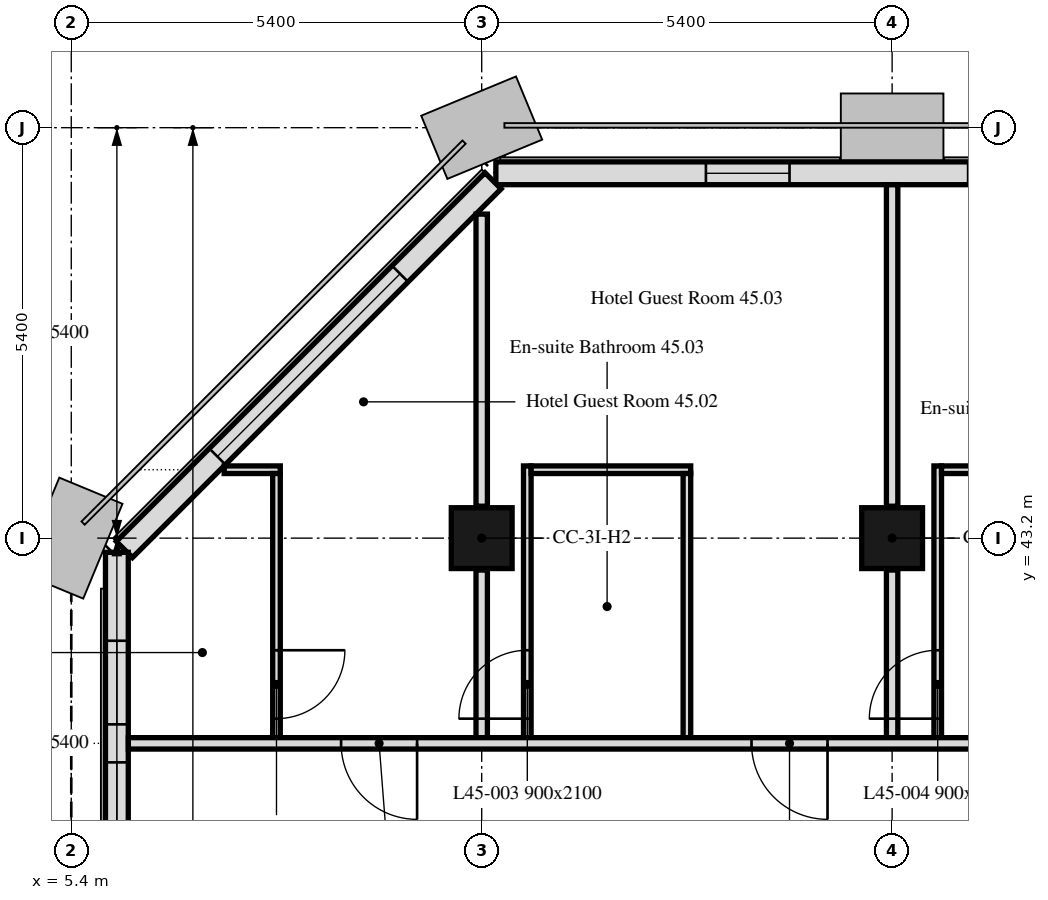
"""IFC4 building model, lengths in metres.
Left out: names, types, materials, properties, quantities, classifications, styles, units other than length and angle.
Written with IfcOpenShell. Run it as: python <this file> out.ifc"""

import sys

from ifc_helpers import new_model, si_unit, direction, frame, frame_2d, origin, origin_2d, place, context, subcontext, project, spatial, rectangle, extrude, element, fill, save


model = new_model("IFC4")
c1 = context("Model", 3, precision=1e-05, world=origin(), true_north=direction((0.0, 1.0)))
c2 = subcontext(c1, "Body", "Model", "MODEL_VIEW")
j1 = project(units=[si_unit("LENGTHUNIT", "METRE"), si_unit("PLANEANGLEUNIT", "RADIAN")], contexts=[c1])
p1 = place(None, origin())
s1 = spatial("IfcSite", under=j1, at=p1, CompositionType="ELEMENT")
p2 = place(p1, origin())
s2 = spatial("IfcBuilding", under=s1, at=p2, CompositionType="ELEMENT")
p3 = place(p2, frame((0.0, 0.0, 187.3)))
s3 = spatial("IfcBuildingStorey", under=s2, at=p3, CompositionType="ELEMENT", Elevation=187.3)
for number, where, z_axis, x_axis in (
    (1, (10.8, 43.2, 0.0), (0.0, 0.0, 1.0), (1.0, 0.0, 0.0)),
    (2, (16.2, 43.2, 0.0), (0.0, 0.0, 1.0), (1.0, 0.0, 0.0)),
):
    element("IfcColumn", number, at=place(p3, frame(where, z_axis=z_axis, x_axis=x_axis)), inside=s3, PredefinedType="COLUMN", context=c2, shape_type="SweptSolid", body=[
        extrude(rectangle(XDim=0.8, YDim=0.8, at=origin_2d()), origin(), (0.0, 0.0, 1.0), 3.0),
    ])
p4 = place(p3, frame((43.014, 48.0, 0.0), z_axis=(0.0, 0.0, 1.0), x_axis=(-1.0, 0.0, 0.0)))
e3 = element("IfcWall", 3, at=p4, inside=s3, PredefinedType="SOLIDWALL", context=c2, shape_type="SweptSolid", body=[
    extrude(rectangle(XDim=32.027, YDim=0.3, at=frame_2d((16.014, 0.0))), origin(), (0.0, 0.0, 1.0), 3.0),
])
p5 = place(p4, frame((0.814, 0.0, 0.9)))
e4 = element("IfcOpeningElement", 4, at=p5, cuts=e3, PredefinedType="OPENING", context=c2, shape_type="SweptSolid", body=[
    extrude(rectangle(XDim=3.4, YDim=1.7, at=frame_2d((1.7, 0.85))), frame((0.0, 0.16, 0.0), z_axis=(0.0, -1.0, 0.0), x_axis=(1.0, 0.0, 0.0)), (0.0, 0.0, 1.0), 0.32),
])
p6 = place(p4, frame((6.564, 0.0, 0.9)))
e5 = element("IfcOpeningElement", 5, at=p6, cuts=e3, PredefinedType="OPENING", context=c2, shape_type="SweptSolid", body=[
    extrude(rectangle(XDim=1.1, YDim=1.7, at=frame_2d((0.55, 0.85))), frame((0.0, 0.16, 0.0), z_axis=(0.0, -1.0, 0.0), x_axis=(1.0, 0.0, 0.0)), (0.0, 0.0, 1.0), 0.32),
])
p7 = place(p4, frame((11.614, 0.0, 0.9)))
e6 = element("IfcOpeningElement", 6, at=p7, cuts=e3, PredefinedType="OPENING", context=c2, shape_type="SweptSolid", body=[
    extrude(rectangle(XDim=3.4, YDim=1.7, at=frame_2d((1.7, 0.85))), frame((0.0, 0.16, 0.0), z_axis=(0.0, -1.0, 0.0), x_axis=(1.0, 0.0, 0.0)), (0.0, 0.0, 1.0), 0.32),
])
p8 = place(p4, frame((17.364, 0.0, 0.9)))
e7 = element("IfcOpeningElement", 7, at=p8, cuts=e3, PredefinedType="OPENING", context=c2, shape_type="SweptSolid", body=[
    extrude(rectangle(XDim=1.1, YDim=1.7, at=frame_2d((0.55, 0.85))), frame((0.0, 0.16, 0.0), z_axis=(0.0, -1.0, 0.0), x_axis=(1.0, 0.0, 0.0)), (0.0, 0.0, 1.0), 0.32),
])
p9 = place(p4, frame((22.414, 0.0, 0.9)))
e8 = element("IfcOpeningElement", 8, at=p9, cuts=e3, PredefinedType="OPENING", context=c2, shape_type="SweptSolid", body=[
    extrude(rectangle(XDim=3.4, YDim=1.7, at=frame_2d((1.7, 0.85))), frame((0.0, 0.16, 0.0), z_axis=(0.0, -1.0, 0.0), x_axis=(1.0, 0.0, 0.0)), (0.0, 0.0, 1.0), 0.32),
])
p10 = place(p4, frame((28.164, 0.0, 0.9)))
e9 = element("IfcOpeningElement", 9, at=p10, cuts=e3, PredefinedType="OPENING", context=c2, shape_type="SweptSolid", body=[
    extrude(rectangle(XDim=1.1, YDim=1.7, at=frame_2d((0.55, 0.85))), frame((0.0, 0.16, 0.0), z_axis=(0.0, -1.0, 0.0), x_axis=(1.0, 0.0, 0.0)), (0.0, 0.0, 1.0), 0.32),
])
p11 = place(p3, frame((10.949, 47.901, 0.0), z_axis=(0.0, 0.0, 1.0), x_axis=(-0.707106781187, -0.707106781187, 0.0)))
e10 = element("IfcWall", 10, at=p11, inside=s3, PredefinedType="SOLIDWALL", context=c2, shape_type="SweptSolid", body=[
    extrude(rectangle(XDim=6.86, YDim=0.3, at=frame_2d((3.43, 0.0))), origin(), (0.0, 0.0, 1.0), 3.0),
])
p12 = place(p11, frame((1.73, 0.0, 0.9)))
e11 = element("IfcOpeningElement", 11, at=p12, cuts=e10, PredefinedType="OPENING", context=c2, shape_type="SweptSolid", body=[
    extrude(rectangle(XDim=3.4, YDim=1.7, at=frame_2d((1.7, 0.85))), frame((0.0, 0.16, 0.0), z_axis=(0.0, -1.0, 0.0), x_axis=(1.0, 0.0, 0.0)), (0.0, 0.0, 1.0), 0.32),
])
p13 = place(p3, frame((6.0, 43.014, 0.0), z_axis=(0.0, 0.0, 1.0), x_axis=(0.0, -1.0, 0.0)))
e12 = element("IfcWall", 12, at=p13, inside=s3, PredefinedType="SOLIDWALL", context=c2, shape_type="SweptSolid", body=[
    extrude(rectangle(XDim=10.614, YDim=0.3, at=frame_2d((5.307, 0.0))), origin(), (0.0, 0.0, 1.0), 3.0),
])
p14 = place(p13, frame((1.164, 0.0, 0.9)))
e13 = element("IfcOpeningElement", 13, at=p14, cuts=e12, PredefinedType="OPENING", context=c2, shape_type="SweptSolid", body=[
    extrude(rectangle(XDim=1.1, YDim=1.7, at=frame_2d((0.55, 0.85))), frame((0.0, 0.16, 0.0), z_axis=(0.0, -1.0, 0.0), x_axis=(1.0, 0.0, 0.0)), (0.0, 0.0, 1.0), 0.32),
])
p15 = place(p13, frame((2.764, 0.0, 0.9)))
e14 = element("IfcOpeningElement", 14, at=p15, cuts=e12, PredefinedType="OPENING", context=c2, shape_type="SweptSolid", body=[
    extrude(rectangle(XDim=1.1, YDim=1.7, at=frame_2d((0.55, 0.85))), frame((0.0, 0.16, 0.0), z_axis=(0.0, -1.0, 0.0), x_axis=(1.0, 0.0, 0.0)), (0.0, 0.0, 1.0), 0.32),
])
p16 = place(p13, frame((6.564, 0.0, 0.9)))
e15 = element("IfcOpeningElement", 15, at=p16, cuts=e12, PredefinedType="OPENING", context=c2, shape_type="SweptSolid", body=[
    extrude(rectangle(XDim=1.1, YDim=1.7, at=frame_2d((0.55, 0.85))), frame((0.0, 0.16, 0.0), z_axis=(0.0, -1.0, 0.0), x_axis=(1.0, 0.0, 0.0)), (0.0, 0.0, 1.0), 0.32),
])
p17 = place(p13, frame((8.164, 0.0, 0.9)))
e16 = element("IfcOpeningElement", 16, at=p17, cuts=e12, PredefinedType="OPENING", context=c2, shape_type="SweptSolid", body=[
    extrude(rectangle(XDim=1.1, YDim=1.7, at=frame_2d((0.55, 0.85))), frame((0.0, 0.16, 0.0), z_axis=(0.0, -1.0, 0.0), x_axis=(1.0, 0.0, 0.0)), (0.0, 0.0, 1.0), 0.32),
])
p18 = place(p3, frame((7.412, 44.1, 0.0), z_axis=(0.0, 0.0, 1.0), x_axis=(1.0, 0.0, 0.0)))
e17 = element("IfcWall", 17, at=p18, inside=s3, PredefinedType="PARTITIONING", context=c2, shape_type="SweptSolid", body=[
    extrude(rectangle(XDim=0.738, YDim=0.1, at=frame_2d((0.369, 0.0))), origin(), (0.0, 0.0, 1.0), 3.0),
])
p19 = place(p3, frame((8.1, 44.05, 0.0), z_axis=(0.0, 0.0, 1.0), x_axis=(0.0, -1.0, 0.0)))
e18 = element("IfcWall", 18, at=p19, inside=s3, PredefinedType="PARTITIONING", context=c2, shape_type="SweptSolid", body=[
    extrude(rectangle(XDim=3.475, YDim=0.1, at=frame_2d((1.738, 0.0))), origin(), (0.0, 0.0, 1.0), 3.0),
])
p20 = place(p19, frame((2.325, 0.0, 0.0)))
e19 = element("IfcOpeningElement", 19, at=p20, cuts=e18, PredefinedType="OPENING", context=c2, shape_type="SweptSolid", body=[
    extrude(rectangle(XDim=0.9, YDim=2.1, at=frame_2d((0.45, 1.05))), frame((0.0, 0.05, 0.0), z_axis=(0.0, -1.0, 0.0), x_axis=(1.0, 0.0, 0.0)), (0.0, 0.0, 1.0), 0.1),
])
p21 = place(p3, frame((10.8, 40.575, 0.0), z_axis=(0.0, 0.0, 1.0), x_axis=(0.0, 1.0, 0.0)))
e20 = element("IfcWall", 20, at=p21, inside=s3, PredefinedType="PARTITIONING", context=c2, shape_type="SweptSolid", body=[
    extrude(rectangle(XDim=2.205, YDim=0.15, at=frame_2d((1.103, 0.0))), origin(), (0.0, 0.0, 1.0), 3.0),
])
p22 = place(p3, frame((10.8, 43.62, 0.0), z_axis=(0.0, 0.0, 1.0), x_axis=(0.0, 1.0, 0.0)))
e21 = element("IfcWall", 21, at=p22, inside=s3, PredefinedType="PARTITIONING", context=c2, shape_type="SweptSolid", body=[
    extrude(rectangle(XDim=3.843, YDim=0.15, at=frame_2d((1.921, 0.0))), origin(), (0.0, 0.0, 1.0), 3.0),
])
p23 = place(p3, frame((11.4, 40.575, 0.0), z_axis=(0.0, 0.0, 1.0), x_axis=(0.0, 1.0, 0.0)))
e22 = element("IfcWall", 22, at=p23, inside=s3, PredefinedType="PARTITIONING", context=c2, shape_type="SweptSolid", body=[
    extrude(rectangle(XDim=3.575, YDim=0.1, at=frame_2d((1.788, 0.0))), origin(), (0.0, 0.0, 1.0), 3.0),
])
p24 = place(p23, frame((0.25, 0.0, 0.0)))
e23 = element("IfcOpeningElement", 23, at=p24, cuts=e22, PredefinedType="OPENING", context=c2, shape_type="SweptSolid", body=[
    extrude(rectangle(XDim=0.9, YDim=2.1, at=frame_2d((0.45, 1.05))), frame((0.0, 0.05, 0.0), z_axis=(0.0, -1.0, 0.0), x_axis=(1.0, 0.0, 0.0)), (0.0, 0.0, 1.0), 0.1),
])
p25 = place(p3, frame((11.45, 44.1, 0.0), z_axis=(0.0, 0.0, 1.0), x_axis=(1.0, 0.0, 0.0)))
e24 = element("IfcWall", 24, at=p25, inside=s3, PredefinedType="PARTITIONING", context=c2, shape_type="SweptSolid", body=[
    extrude(rectangle(XDim=2.1, YDim=0.1, at=frame_2d((1.05, 0.0))), origin(), (0.0, 0.0, 1.0), 3.0),
])
p26 = place(p3, frame((13.5, 44.05, 0.0), z_axis=(0.0, 0.0, 1.0), x_axis=(0.0, -1.0, 0.0)))
e25 = element("IfcWall", 25, at=p26, inside=s3, PredefinedType="PARTITIONING", context=c2, shape_type="SweptSolid", body=[
    extrude(rectangle(XDim=3.475, YDim=0.1, at=frame_2d((1.738, 0.0))), origin(), (0.0, 0.0, 1.0), 3.0),
])
p27 = place(p3, frame((16.2, 40.575, 0.0), z_axis=(0.0, 0.0, 1.0), x_axis=(0.0, 1.0, 0.0)))
e26 = element("IfcWall", 26, at=p27, inside=s3, PredefinedType="PARTITIONING", context=c2, shape_type="SweptSolid", body=[
    extrude(rectangle(XDim=2.205, YDim=0.15, at=frame_2d((1.103, 0.0))), origin(), (0.0, 0.0, 1.0), 2.4),
])
p28 = place(p3, frame((16.2, 43.62, 0.0), z_axis=(0.0, 0.0, 1.0), x_axis=(0.0, 1.0, 0.0)))
e27 = element("IfcWall", 27, at=p28, inside=s3, PredefinedType="PARTITIONING", context=c2, shape_type="SweptSolid", body=[
    extrude(rectangle(XDim=4.229, YDim=0.15, at=frame_2d((2.115, 0.0))), origin(), (0.0, 0.0, 1.0), 2.4),
])
p29 = place(p3, frame((16.8, 40.575, 0.0), z_axis=(0.0, 0.0, 1.0), x_axis=(0.0, 1.0, 0.0)))
e28 = element("IfcWall", 28, at=p29, inside=s3, PredefinedType="PARTITIONING", context=c2, shape_type="SweptSolid", body=[
    extrude(rectangle(XDim=3.575, YDim=0.1, at=frame_2d((1.788, 0.0))), origin(), (0.0, 0.0, 1.0), 3.0),
])
p30 = place(p29, frame((0.25, 0.0, 0.0)))
e29 = element("IfcOpeningElement", 29, at=p30, cuts=e28, PredefinedType="OPENING", context=c2, shape_type="SweptSolid", body=[
    extrude(rectangle(XDim=0.9, YDim=2.1, at=frame_2d((0.45, 1.05))), frame((0.0, 0.05, 0.0), z_axis=(0.0, -1.0, 0.0), x_axis=(1.0, 0.0, 0.0)), (0.0, 0.0, 1.0), 0.1),
])
p31 = place(p3, frame((16.85, 44.1, 0.0), z_axis=(0.0, 0.0, 1.0), x_axis=(1.0, 0.0, 0.0)))
e30 = element("IfcWall", 30, at=p31, inside=s3, PredefinedType="PARTITIONING", context=c2, shape_type="SweptSolid", body=[
    extrude(rectangle(XDim=2.1, YDim=0.1, at=frame_2d((1.05, 0.0))), origin(), (0.0, 0.0, 1.0), 3.0),
])
p32 = place(p3, frame((47.849, 40.5, 0.0), z_axis=(0.0, 0.0, 1.0), x_axis=(-1.0, 0.0, 0.0)))
e31 = element("IfcWall", 31, at=p32, inside=s3, PredefinedType="PARTITIONING", context=c2, shape_type="SweptSolid", body=[
    extrude(rectangle(XDim=41.698, YDim=0.15, at=frame_2d((20.849, 0.0))), origin(), (0.0, 0.0, 1.0), 2.4),
])
p33 = place(p32, frame((37.899, 0.0, 0.0)))
e32 = element("IfcOpeningElement", 32, at=p33, cuts=e31, PredefinedType="OPENING", context=c2, shape_type="SweptSolid", body=[
    extrude(rectangle(XDim=1.0, YDim=2.1, at=frame_2d((0.5, 1.05))), frame((0.0, 0.075, 0.0), z_axis=(0.0, -1.0, 0.0), x_axis=(1.0, 0.0, 0.0)), (0.0, 0.0, 1.0), 0.15),
])
p34 = place(p32, frame((32.499, 0.0, 0.0)))
e33 = element("IfcOpeningElement", 33, at=p34, cuts=e31, PredefinedType="OPENING", context=c2, shape_type="SweptSolid", body=[
    extrude(rectangle(XDim=1.0, YDim=2.1, at=frame_2d((0.5, 1.05))), frame((0.0, 0.075, 0.0), z_axis=(0.0, -1.0, 0.0), x_axis=(1.0, 0.0, 0.0)), (0.0, 0.0, 1.0), 0.15),
])
p35 = place(p32, frame((27.099, 0.0, 0.0)))
e34 = element("IfcOpeningElement", 34, at=p35, cuts=e31, PredefinedType="OPENING", context=c2, shape_type="SweptSolid", body=[
    extrude(rectangle(XDim=1.0, YDim=2.1, at=frame_2d((0.5, 1.05))), frame((0.0, 0.075, 0.0), z_axis=(0.0, -1.0, 0.0), x_axis=(1.0, 0.0, 0.0)), (0.0, 0.0, 1.0), 0.15),
])
p36 = place(p32, frame((21.699, 0.0, 0.0)))
e35 = element("IfcOpeningElement", 35, at=p36, cuts=e31, PredefinedType="OPENING", context=c2, shape_type="SweptSolid", body=[
    extrude(rectangle(XDim=1.0, YDim=2.1, at=frame_2d((0.5, 1.05))), frame((0.0, 0.075, 0.0), z_axis=(0.0, -1.0, 0.0), x_axis=(1.0, 0.0, 0.0)), (0.0, 0.0, 1.0), 0.15),
])
p37 = place(p32, frame((16.299, 0.0, 0.0)))
e36 = element("IfcOpeningElement", 36, at=p37, cuts=e31, PredefinedType="OPENING", context=c2, shape_type="SweptSolid", body=[
    extrude(rectangle(XDim=1.0, YDim=2.1, at=frame_2d((0.5, 1.05))), frame((0.0, 0.075, 0.0), z_axis=(0.0, -1.0, 0.0), x_axis=(1.0, 0.0, 0.0)), (0.0, 0.0, 1.0), 0.15),
])
p38 = place(p32, frame((10.899, 0.0, 0.0)))
e37 = element("IfcOpeningElement", 37, at=p38, cuts=e31, PredefinedType="OPENING", context=c2, shape_type="SweptSolid", body=[
    extrude(rectangle(XDim=1.0, YDim=2.1, at=frame_2d((0.5, 1.05))), frame((0.0, 0.075, 0.0), z_axis=(0.0, -1.0, 0.0), x_axis=(1.0, 0.0, 0.0)), (0.0, 0.0, 1.0), 0.15),
])
p39 = place(p32, frame((2.849, 0.0, 0.0)))
e38 = element("IfcOpeningElement", 38, at=p39, cuts=e31, PredefinedType="OPENING", context=c2, shape_type="SweptSolid", body=[
    extrude(rectangle(XDim=1.0, YDim=2.1, at=frame_2d((0.5, 1.05))), frame((0.0, 0.075, 0.0), z_axis=(0.0, -1.0, 0.0), x_axis=(1.0, 0.0, 0.0)), (0.0, 0.0, 1.0), 0.15),
])
p40 = place(p10, origin())
e39 = element("IfcWindow", 39, at=p40, inside=s3, PartitioningType="SINGLE_PANEL", PredefinedType="WINDOW", context=c2, shape_type="SweptSolid", body=[
    extrude(rectangle(XDim=1.1, YDim=1.7, at=frame_2d((0.55, 0.85))), frame((0.0, 0.03, 0.0), z_axis=(0.0, -1.0, 0.0), x_axis=(1.0, 0.0, 0.0)), (0.0, 0.0, 1.0), 0.06),
])
fill(e9, e39)
p41 = place(p12, origin())
e40 = element("IfcWindow", 40, at=p41, inside=s3, PartitioningType="SINGLE_PANEL", PredefinedType="WINDOW", context=c2, shape_type="SweptSolid", body=[
    extrude(rectangle(XDim=3.4, YDim=1.7, at=frame_2d((1.7, 0.85))), frame((0.0, 0.03, 0.0), z_axis=(0.0, -1.0, 0.0), x_axis=(1.0, 0.0, 0.0)), (0.0, 0.0, 1.0), 0.06),
])
fill(e11, e40)
p42 = place(p14, origin())
e41 = element("IfcWindow", 41, at=p42, inside=s3, PartitioningType="SINGLE_PANEL", PredefinedType="WINDOW", context=c2, shape_type="SweptSolid", body=[
    extrude(rectangle(XDim=1.1, YDim=1.7, at=frame_2d((0.55, 0.85))), frame((0.0, 0.03, 0.0), z_axis=(0.0, -1.0, 0.0), x_axis=(1.0, 0.0, 0.0)), (0.0, 0.0, 1.0), 0.06),
])
fill(e13, e41)
p43 = place(p15, origin())
e42 = element("IfcWindow", 42, at=p43, inside=s3, PartitioningType="SINGLE_PANEL", PredefinedType="WINDOW", context=c2, shape_type="SweptSolid", body=[
    extrude(rectangle(XDim=1.1, YDim=1.7, at=frame_2d((0.55, 0.85))), frame((0.0, 0.03, 0.0), z_axis=(0.0, -1.0, 0.0), x_axis=(1.0, 0.0, 0.0)), (0.0, 0.0, 1.0), 0.06),
])
fill(e14, e42)
p44 = place(p20, origin())
e43 = element("IfcDoor", 43, at=p44, inside=s3, OperationType="SINGLE_SWING_RIGHT", PredefinedType="DOOR", context=c2, shape_type="SweptSolid", body=[
    extrude(rectangle(XDim=0.9, YDim=2.1, at=frame_2d((0.45, 1.05))), frame((0.0, 0.025, 0.0), z_axis=(0.0, -1.0, 0.0), x_axis=(1.0, 0.0, 0.0)), (0.0, 0.0, 1.0), 0.05),
])
fill(e19, e43)
p45 = place(p24, origin())
e44 = element("IfcDoor", 44, at=p45, inside=s3, OperationType="SINGLE_SWING_RIGHT", PredefinedType="DOOR", context=c2, shape_type="SweptSolid", body=[
    extrude(rectangle(XDim=0.9, YDim=2.1, at=frame_2d((0.45, 1.05))), frame((0.0, 0.025, 0.0), z_axis=(0.0, -1.0, 0.0), x_axis=(1.0, 0.0, 0.0)), (0.0, 0.0, 1.0), 0.05),
])
fill(e23, e44)
p46 = place(p30, origin())
e45 = element("IfcDoor", 45, at=p46, inside=s3, OperationType="SINGLE_SWING_LEFT", PredefinedType="DOOR", context=c2, shape_type="SweptSolid", body=[
    extrude(rectangle(XDim=0.9, YDim=2.1, at=frame_2d((0.45, 1.05))), frame((0.0, 0.025, 0.0), z_axis=(0.0, -1.0, 0.0), x_axis=(1.0, 0.0, 0.0)), (0.0, 0.0, 1.0), 0.05),
])
fill(e29, e45)
p47 = place(p33, origin())
e46 = element("IfcDoor", 46, at=p47, inside=s3, OperationType="SINGLE_SWING_RIGHT", PredefinedType="DOOR", context=c2, shape_type="SweptSolid", body=[
    extrude(rectangle(XDim=1.0, YDim=2.1, at=frame_2d((0.5, 1.05))), frame((0.0, 0.025, 0.0), z_axis=(0.0, -1.0, 0.0), x_axis=(1.0, 0.0, 0.0)), (0.0, 0.0, 1.0), 0.05),
])
fill(e32, e46)
p48 = place(p34, origin())
e47 = element("IfcDoor", 47, at=p48, inside=s3, OperationType="SINGLE_SWING_LEFT", PredefinedType="DOOR", context=c2, shape_type="SweptSolid", body=[
    extrude(rectangle(XDim=1.0, YDim=2.1, at=frame_2d((0.5, 1.05))), frame((0.0, 0.025, 0.0), z_axis=(0.0, -1.0, 0.0), x_axis=(1.0, 0.0, 0.0)), (0.0, 0.0, 1.0), 0.05),
])
fill(e33, e47)
save(model, sys.argv[1])
